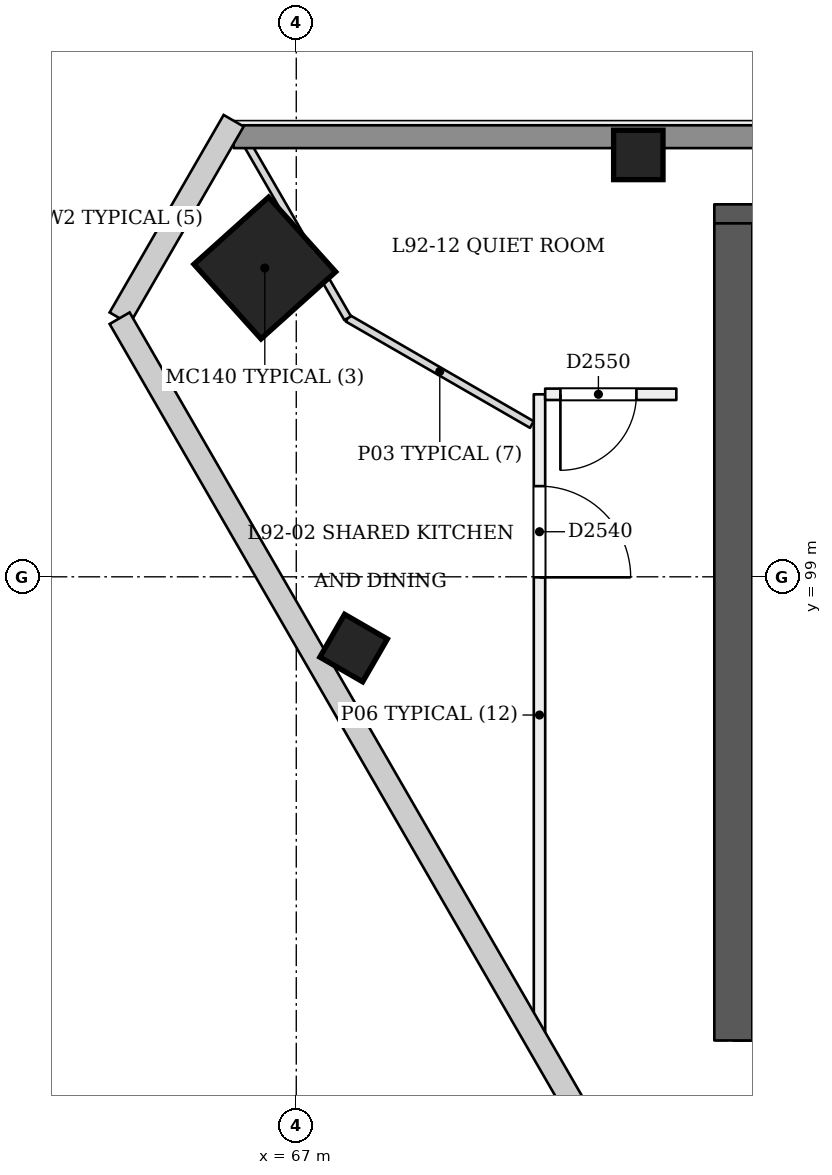
"""IFC4 building model, lengths in metres.
Left out: names, types, materials, properties, quantities, classifications, styles, units other than length and angle.
Written with IfcOpenShell. Run it as: python <this file> out.ifc"""

import sys

from ifc_helpers import new_model, si_unit, direction, frame, frame_2d, origin, origin_2d, place, context, subcontext, project, spatial, rectangle, extrude, element, fill, save


model = new_model("IFC4")
c1 = context("Model", 3, precision=1e-05, world=origin(), true_north=direction((0.0, 1.0)))
c2 = subcontext(c1, "Body", "Model", "MODEL_VIEW")
j1 = project(units=[si_unit("LENGTHUNIT", "METRE"), si_unit("PLANEANGLEUNIT", "RADIAN")], contexts=[c1])
p1 = place(None, origin())
s1 = spatial("IfcSite", under=j1, at=p1, CompositionType="ELEMENT")
p2 = place(p1, origin())
s2 = spatial("IfcBuilding", under=s1, at=p2, CompositionType="ELEMENT")
p3 = place(p2, frame((0.0, 0.0, 354.4)))
s3 = spatial("IfcBuildingStorey", under=s2, at=p3, CompositionType="ELEMENT", Elevation=354.4)
p4 = place(p3, frame((72.75, 93.15, 0.0), z_axis=(0.0, 0.0, 1.0), x_axis=(1.0, 0.0, 0.0)))
e1 = element("IfcWall", 1, at=p4, inside=s3, PredefinedType="SHEAR", context=c2, shape_type="SweptSolid", body=[
    extrude(rectangle(XDim=24.75, YDim=0.5, at=frame_2d((12.375, 0.0))), origin(), (0.0, 0.0, 1.0), 3.6),
])
p5 = place(p4, frame((1.05, 0.0, 0.0)))
e2 = element("IfcOpeningElement", 2, at=p5, cuts=e1, PredefinedType="OPENING", context=c2, shape_type="SweptSolid", body=[
    extrude(rectangle(XDim=1.2, YDim=2.1, at=frame_2d((0.6, 1.05))), frame((0.0, 0.26, 0.0), z_axis=(0.0, -1.0, 0.0), x_axis=(1.0, 0.0, 0.0)), (0.0, 0.0, 1.0), 0.521),
])
p6 = place(p4, frame((3.25, 0.0, 0.0)))
e3 = element("IfcOpeningElement", 3, at=p6, cuts=e1, PredefinedType="OPENING", context=c2, shape_type="SweptSolid", body=[
    extrude(rectangle(XDim=1.2, YDim=2.1, at=frame_2d((0.6, 1.05))), frame((0.0, 0.26, 0.0), z_axis=(0.0, -1.0, 0.0), x_axis=(1.0, 0.0, 0.0)), (0.0, 0.0, 1.0), 0.521),
])
p7 = place(p4, frame((13.25, 0.0, 0.0)))
e4 = element("IfcOpeningElement", 4, at=p7, cuts=e1, PredefinedType="OPENING", context=c2, shape_type="SweptSolid", body=[
    extrude(rectangle(XDim=1.2, YDim=2.1, at=frame_2d((0.6, 1.05))), frame((0.0, 0.26, 0.0), z_axis=(0.0, -1.0, 0.0), x_axis=(1.0, 0.0, 0.0)), (0.0, 0.0, 1.0), 0.521),
])
p8 = place(p4, frame((15.712, 0.0, 0.0)))
e5 = element("IfcOpeningElement", 5, at=p8, cuts=e1, PredefinedType="OPENING", context=c2, shape_type="SweptSolid", body=[
    extrude(rectangle(XDim=1.0, YDim=2.1, at=frame_2d((0.5, 1.05))), frame((0.0, 0.26, 0.0), z_axis=(0.0, -1.0, 0.0), x_axis=(1.0, 0.0, 0.0)), (0.0, 0.0, 1.0), 0.521),
])
p9 = place(p4, frame((18.15, 0.0, 0.0)))
e6 = element("IfcOpeningElement", 6, at=p9, cuts=e1, PredefinedType="OPENING", context=c2, shape_type="SweptSolid", body=[
    extrude(rectangle(XDim=1.0, YDim=2.1, at=frame_2d((0.5, 1.05))), frame((0.0, 0.26, 0.0), z_axis=(0.0, -1.0, 0.0), x_axis=(1.0, 0.0, 0.0)), (0.0, 0.0, 1.0), 0.521),
])
p10 = place(p4, frame((20.5, 0.0, 0.0)))
e7 = element("IfcOpeningElement", 7, at=p10, cuts=e1, PredefinedType="OPENING", context=c2, shape_type="SweptSolid", body=[
    extrude(rectangle(XDim=1.0, YDim=2.1, at=frame_2d((0.5, 1.05))), frame((0.0, 0.26, 0.0), z_axis=(0.0, -1.0, 0.0), x_axis=(1.0, 0.0, 0.0)), (0.0, 0.0, 1.0), 0.521),
])
p11 = place(p4, frame((22.788, 0.0, 0.0)))
e8 = element("IfcOpeningElement", 8, at=p11, cuts=e1, PredefinedType="OPENING", context=c2, shape_type="SweptSolid", body=[
    extrude(rectangle(XDim=1.0, YDim=2.1, at=frame_2d((0.5, 1.05))), frame((0.0, 0.26, 0.0), z_axis=(0.0, -1.0, 0.0), x_axis=(1.0, 0.0, 0.0)), (0.0, 0.0, 1.0), 0.521),
])
p12 = place(p3, frame((97.25, 103.65, 0.0), z_axis=(0.0, 0.0, 1.0), x_axis=(-1.0, 0.0, 0.0)))
e9 = element("IfcWall", 9, at=p12, inside=s3, PredefinedType="SHEAR", context=c2, shape_type="SweptSolid", body=[
    extrude(rectangle(XDim=24.75, YDim=0.5, at=frame_2d((12.375, 0.0))), origin(), (0.0, 0.0, 1.0), 3.6),
])
p13 = place(p3, frame((72.75, 103.65, 0.0), z_axis=(0.0, 0.0, 1.0), x_axis=(0.0, -1.0, 0.0)))
e10 = element("IfcWall", 10, at=p13, inside=s3, PredefinedType="SHEAR", context=c2, shape_type="SweptSolid", body=[
    extrude(rectangle(XDim=10.75, YDim=0.5, at=frame_2d((5.375, 0.0))), origin(), (0.0, 0.0, 1.0), 3.6),
])
p14 = place(p3, frame((66.552, 103.051, 0.0), z_axis=(0.028401814599, 0.009218727412, 0.999554076572), x_axis=(-0.865124423326, 0.50115998712, 0.019959946774)))
e11 = element("IfcColumn", 11, at=p14, inside=s3, PredefinedType="COLUMN", context=c2, shape_type="SweptSolid", body=[
    extrude(rectangle(XDim=1.32, YDim=1.32, at=origin_2d()), origin(), (0.0, 0.0, 1.0), 3.602),
])
p15 = place(p3, frame((71.5, 104.55, 0.0), z_axis=(0.0, 0.0, 1.0), x_axis=(1.0, 0.0, 0.0)))
e12 = element("IfcColumn", 12, at=p15, inside=s3, PredefinedType="COLUMN", context=c2, shape_type="SweptSolid", body=[
    extrude(rectangle(XDim=0.65, YDim=0.65, at=origin_2d()), origin(), (0.0, 0.0, 1.0), 3.6),
])
p16 = place(p3, frame((67.727, 98.016, -0.02), z_axis=(0.022222910879, 0.038415824599, 0.999014697916), x_axis=(-0.866021331072, -0.498527657424, 0.038434735731)))
e13 = element("IfcColumn", 13, at=p16, inside=s3, PredefinedType="COLUMN", context=c2, shape_type="SweptSolid", body=[
    extrude(rectangle(XDim=0.65, YDim=0.65, at=origin_2d()), origin(), (0.0, 0.0, 1.0), 3.604),
])
p17 = place(p3, frame((70.2, 101.401, 0.0), z_axis=(0.0, 0.0, 1.0), x_axis=(2.8931837e-05, -0.999999999581, 0.0)))
e14 = element("IfcWall", 14, at=p17, inside=s3, PredefinedType="PARTITIONING", context=c2, shape_type="SweptSolid", body=[
    extrude(rectangle(XDim=8.438, YDim=0.15, at=frame_2d((4.219, 0.0))), origin(), (0.0, 0.0, 1.0), 3.3),
])
p18 = place(p17, frame((1.208, 0.0, 0.0)))
e15 = element("IfcOpeningElement", 15, at=p18, cuts=e14, PredefinedType="OPENING", context=c2, shape_type="SweptSolid", body=[
    extrude(rectangle(XDim=1.2, YDim=2.1, at=frame_2d((0.6, 1.05))), frame((0.0, 0.085, 0.0), z_axis=(0.0, -1.0, 0.0), x_axis=(1.0, 0.0, 0.0)), (0.0, 0.0, 1.0), 0.171),
])
p19 = place(p3, frame((72.0, 101.401, 0.0), z_axis=(0.0, 0.0, 1.0), x_axis=(-1.0, 0.0, 0.0)))
e16 = element("IfcWall", 16, at=p19, inside=s3, PredefinedType="PARTITIONING", context=c2, shape_type="SweptSolid", body=[
    extrude(rectangle(XDim=1.725, YDim=0.15, at=frame_2d((0.863, 0.0))), origin(), (0.0, 0.0, 1.0), 3.3),
])
p20 = place(p19, frame((0.525, 0.0, 0.0)))
e17 = element("IfcOpeningElement", 17, at=p20, cuts=e16, PredefinedType="OPENING", context=c2, shape_type="SweptSolid", body=[
    extrude(rectangle(XDim=1.0, YDim=2.1, at=frame_2d((0.5, 1.05))), frame((0.0, 0.085, 0.0), z_axis=(0.0, -1.0, 0.0), x_axis=(1.0, 0.0, 0.0)), (0.0, 0.0, 1.0), 0.171),
])
p21 = place(p3, frame((70.1, 101.003, 0.0), z_axis=(0.0, 0.0, 1.0), x_axis=(-0.866017045845, 0.500014476097, 0.0)))
e18 = element("IfcWall", 18, at=p21, inside=s3, PredefinedType="PARTITIONING", context=c2, shape_type="SweptSolid", body=[
    extrude(rectangle(XDim=2.798, YDim=0.1, at=frame_2d((1.399, 0.0))), origin(), (0.0, 0.0, 1.0), 3.3),
])
p22 = place(p3, frame((67.676, 102.402, 0.0), z_axis=(0.0, 0.0, 1.0), x_axis=(-0.500035042182, 0.866005171226, 0.0)))
e19 = element("IfcWall", 19, at=p22, inside=s3, PredefinedType="PARTITIONING", context=c2, shape_type="SweptSolid", body=[
    extrude(rectangle(XDim=2.885, YDim=0.1, at=frame_2d((1.442, 0.0))), origin(), (0.0, 0.0, 1.0), 3.3),
])
p23 = place(p3, frame((66.176, 104.79, 0.0), z_axis=(0.0, 0.0, 1.0), x_axis=(1.0, 0.0, 0.0)))
e20 = element("IfcWall", 20, at=p23, inside=s3, PredefinedType="SOLIDWALL", context=c2, shape_type="SweptSolid", body=[
    extrude(rectangle(XDim=37.647, YDim=0.3, at=frame_2d((18.824, 0.0))), origin(), (0.0, 0.0, 1.0), 3.3),
])
p24 = place(p18, origin())
e21 = element("IfcDoor", 21, at=p24, inside=s3, OperationType="SINGLE_SWING_RIGHT", PredefinedType="NOTDEFINED", context=c2, shape_type="SweptSolid", body=[
    extrude(rectangle(XDim=1.2, YDim=2.1, at=frame_2d((0.6, 1.05))), frame((0.0, 0.025, 0.0), z_axis=(0.0, -1.0, 0.0), x_axis=(1.0, 0.0, 0.0)), (0.0, 0.0, 1.0), 0.05),
])
fill(e15, e21)
p25 = place(p20, origin())
e22 = element("IfcDoor", 22, at=p25, inside=s3, OperationType="SINGLE_SWING_RIGHT", PredefinedType="NOTDEFINED", context=c2, shape_type="SweptSolid", body=[
    extrude(rectangle(XDim=1.0, YDim=2.1, at=frame_2d((0.5, 1.05))), frame((0.0, 0.025, 0.0), z_axis=(0.0, -1.0, 0.0), x_axis=(1.0, 0.0, 0.0)), (0.0, 0.0, 1.0), 0.05),
])
fill(e17, e22)
save(model, sys.argv[1])
